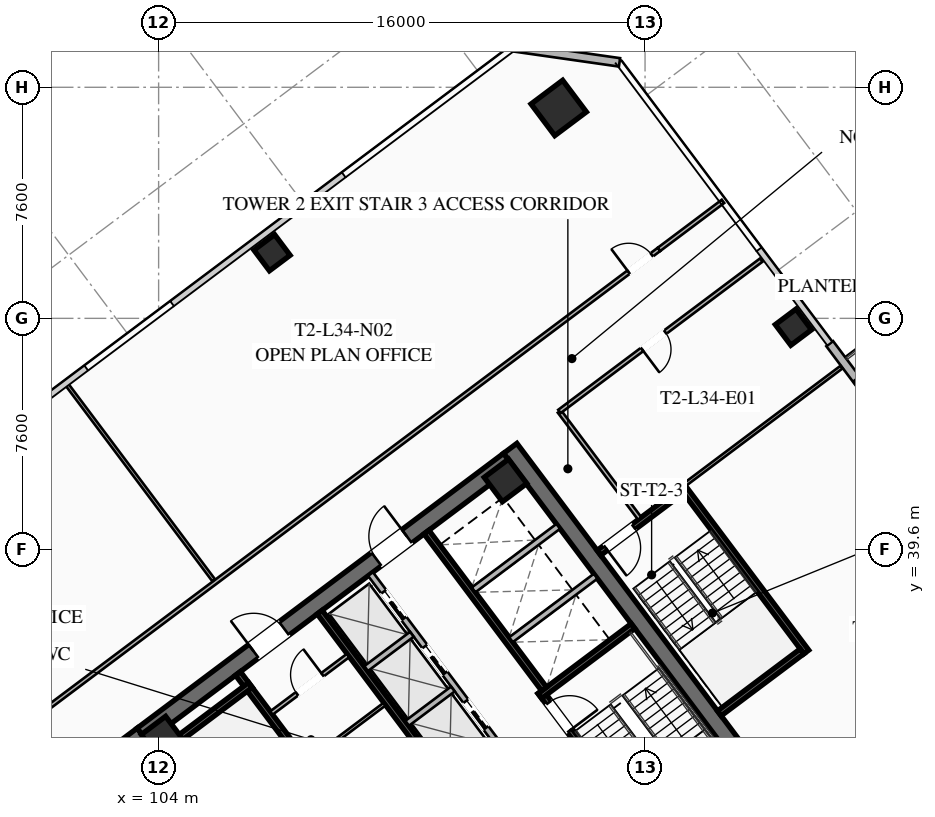
"""IFC4 building model, lengths in metres.
Left out: names, types, materials, properties, quantities, classifications, styles, units other than length and angle.
Written with IfcOpenShell. Run it as: python <this file> out.ifc"""

import sys

from ifc_helpers import new_model, si_unit, direction, frame, frame_2d, origin, origin_2d, place, context, subcontext, project, spatial, rectangle, hollow_rectangle, extrude, element, fill, save


model = new_model("IFC4")
c1 = context("Model", 3, precision=1e-05, world=origin(), true_north=direction((0.0, 1.0)))
c2 = subcontext(c1, "Body", "Model", "MODEL_VIEW")
j1 = project(units=[si_unit("LENGTHUNIT", "METRE"), si_unit("PLANEANGLEUNIT", "RADIAN")], contexts=[c1])
p1 = place(None, origin())
s1 = spatial("IfcSite", under=j1, at=p1, CompositionType="ELEMENT")
p2 = place(p1, origin())
s2 = spatial("IfcBuilding", under=s1, at=p2, CompositionType="ELEMENT")
p3 = place(p2, frame((0.0, 0.0, 128.6)))
s3 = spatial("IfcBuildingStorey", under=s2, at=p3, CompositionType="ELEMENT", Elevation=128.6)
for number, where, z_axis, x_axis in (
    (1, (112.436, 21.077, 0.0), (0.0, 0.0, 1.0), (-0.6, 0.8, 0.0)),
    (2, (115.564, 42.923, 0.0), (0.0, 0.0, 1.0), (0.6, -0.8, 0.0)),
):
    element("IfcWall", number, at=place(p3, frame(where, z_axis=z_axis, x_axis=x_axis)), inside=s3, PredefinedType="SHEAR", context=c2, shape_type="SweptSolid", body=[
        extrude(rectangle(XDim=15.6, YDim=0.55, at=frame_2d((7.8, 0.0))), origin(), (0.0, 0.0, 1.0), 3.55),
    ])
p4 = place(p3, frame((103.461, 33.502, 0.0), z_axis=(0.0, 0.0, 1.0), x_axis=(0.799998054672, 0.600002593761, 0.0)))
e3 = element("IfcWall", 3, at=p4, inside=s3, PredefinedType="SHEAR", context=c2, shape_type="SweptSolid", body=[
    extrude(rectangle(XDim=15.06, YDim=0.55, at=frame_2d((7.53, 0.0))), origin(), (0.0, 0.0, 1.0), 3.55),
])
p5 = place(p4, frame((4.58, 0.0, 0.0)))
e4 = element("IfcOpeningElement", 4, at=p5, cuts=e3, PredefinedType="OPENING", context=c2, shape_type="SweptSolid", body=[
    extrude(rectangle(XDim=1.25, YDim=2.25, at=frame_2d((0.625, 1.125))), frame((0.0, 0.285, 0.0), z_axis=(0.0, -1.0, 0.0), x_axis=(1.0, 0.0, 0.0)), (0.0, 0.0, 1.0), 0.57),
])
p6 = place(p4, frame((9.63, 0.0, 0.0)))
e5 = element("IfcOpeningElement", 5, at=p6, cuts=e3, PredefinedType="OPENING", context=c2, shape_type="SweptSolid", body=[
    extrude(rectangle(XDim=1.25, YDim=2.25, at=frame_2d((0.625, 1.125))), frame((0.0, 0.285, 0.0), z_axis=(0.0, -1.0, 0.0), x_axis=(1.0, 0.0, 0.0)), (0.0, 0.0, 1.0), 0.57),
])
for number, where, z_axis, x_axis in (
    (6, (115.41, 41.87, 0.0), (0.0, 0.0, 1.0), (0.8, 0.6, 0.0)),
    (7, (104.13, 33.41, 0.0), (0.0, 0.0, 1.0), (0.8, 0.6, 0.0)),
):
    element("IfcColumn", number, at=place(p3, frame(where, z_axis=z_axis, x_axis=x_axis)), inside=s3, PredefinedType="COLUMN", context=c2, shape_type="SweptSolid", body=[
        extrude(hollow_rectangle(XDim=1.0, YDim=1.0, WallThickness=0.04, at=origin_2d()), origin(), (0.0, 0.0, 1.0), 3.37),
    ])
p7 = place(p3, frame((117.16, 54.12, 0.0), z_axis=(0.0, 0.0, 1.0), x_axis=(0.799999996291, 0.600000004945, 0.0)))
e8 = element("IfcColumn", 8, at=p7, inside=s3, PredefinedType="COLUMN", context=c2, shape_type="SweptSolid", body=[
    extrude(hollow_rectangle(XDim=1.3, YDim=1.3, WallThickness=0.05, at=origin_2d()), origin(), (0.0, 0.0, 1.0), 3.37),
])
for number, where, z_axis, x_axis in (
    (9, (124.88, 46.91, 0.0), (0.0, 0.0, 1.0), (0.8, 0.6, 0.0)),
    (10, (107.73, 49.36, 0.0), (0.0, 0.0, 1.0), (0.8, 0.6, 0.0)),
):
    element("IfcColumn", number, at=place(p3, frame(where, z_axis=z_axis, x_axis=x_axis)), inside=s3, PredefinedType="COLUMN", context=c2, shape_type="SweptSolid", body=[
        extrude(hollow_rectangle(XDim=0.85, YDim=0.85, WallThickness=0.035, at=origin_2d()), origin(), (0.0, 0.0, 1.0), 3.37),
    ])
p8 = place(p3, frame((126.074, 46.368, 0.0), z_axis=(0.0, 0.0, 1.0), x_axis=(0.600018382406, -0.799986212866, 0.0)))
e11 = element("IfcWall", 11, at=p8, inside=s3, PredefinedType="SOLIDWALL", context=c2, shape_type="SweptSolid", body=[
    extrude(rectangle(XDim=8.5, YDim=0.28, at=frame_2d((4.25, 0.0))), origin(), (0.0, 0.0, 1.0), 3.37),
])
p9 = place(p8, frame((3.6, 0.0, 0.0)))
e12 = element("IfcOpeningElement", 12, at=p9, cuts=e11, PredefinedType="OPENING", context=c2, shape_type="SweptSolid", body=[
    extrude(rectangle(XDim=1.3, YDim=2.15, at=frame_2d((0.65, 1.075))), frame((0.0, 0.15, 0.0), z_axis=(0.0, -1.0, 0.0), x_axis=(1.0, 0.0, 0.0)), (0.0, 0.0, 1.0), 0.3),
])
p10 = place(p8, frame((1.46, 0.0, 0.85)))
e13 = element("IfcOpeningElement", 13, at=p10, cuts=e11, PredefinedType="OPENING", context=c2, shape_type="SweptSolid", body=[
    extrude(rectangle(XDim=1.8, YDim=1.92, at=frame_2d((0.9, 0.96))), frame((0.0, 0.15, 0.0), z_axis=(0.0, -1.0, 0.0), x_axis=(1.0, 0.0, 0.0)), (0.0, 0.0, 1.0), 0.3),
])
p11 = place(p3, frame((115.66, 56.12, 0.0), z_axis=(0.0, 0.0, 1.0), x_axis=(0.989949493661, -0.141421356237, 0.0)))
e14 = element("IfcWall", 14, at=p11, inside=s3, PredefinedType="SOLIDWALL", context=c2, shape_type="SweptSolid", body=[
    extrude(rectangle(XDim=3.536, YDim=0.28, at=frame_2d((1.768, 0.0))), origin(), (0.0, 0.0, 1.0), 3.37),
])
p12 = place(p3, frame((111.44, 29.08, 0.0), z_axis=(0.0, 0.0, 1.0), x_axis=(-0.59999029481, 0.8000072788, 0.0)))
e15 = element("IfcWall", 15, at=p12, inside=s3, PredefinedType="SHEAR", context=c2, shape_type="SweptSolid", body=[
    extrude(rectangle(XDim=8.05, YDim=0.2, at=frame_2d((4.025, 0.0))), origin(), (0.0, 0.0, 1.0), 3.37),
])
p13 = place(p12, frame((0.45, 0.0, 0.0)))
e16 = element("IfcOpeningElement", 16, at=p13, cuts=e15, PredefinedType="OPENING", context=c2, shape_type="SweptSolid", body=[
    extrude(rectangle(XDim=1.15, YDim=2.2, at=frame_2d((0.575, 1.1))), frame((0.0, 0.11, 0.0), z_axis=(0.0, -1.0, 0.0), x_axis=(1.0, 0.0, 0.0)), (0.0, 0.0, 1.0), 0.22),
])
p14 = place(p3, frame((103.956, 32.842, 0.0), z_axis=(0.0, 0.0, 1.0), x_axis=(0.800015298837, 0.599979601008, 0.0)))
e17 = element("IfcWall", 17, at=p14, inside=s3, PredefinedType="SHEAR", context=c2, shape_type="SweptSolid", body=[
    extrude(rectangle(XDim=3.83, YDim=0.2, at=frame_2d((1.915, 0.0))), origin(), (0.0, 0.0, 1.0), 3.37),
])
p15 = place(p3, frame((116.56, 34.92, 0.0), z_axis=(0.0, 0.0, 1.0), x_axis=(0.59999029481, -0.8000072788, 0.0)))
e18 = element("IfcWall", 18, at=p15, inside=s3, PredefinedType="SHEAR", context=c2, shape_type="SweptSolid", body=[
    extrude(rectangle(XDim=8.05, YDim=0.2, at=frame_2d((4.025, 0.0))), origin(), (0.0, 0.0, 1.0), 3.37),
])
p16 = place(p15, frame((0.45, 0.0, 0.0)))
e19 = element("IfcOpeningElement", 19, at=p16, cuts=e18, PredefinedType="OPENING", context=c2, shape_type="SweptSolid", body=[
    extrude(rectangle(XDim=1.15, YDim=2.2, at=frame_2d((0.575, 1.1))), frame((0.0, 0.11, 0.0), z_axis=(0.0, -1.0, 0.0), x_axis=(1.0, 0.0, 0.0)), (0.0, 0.0, 1.0), 0.22),
])
p17 = place(p3, frame((116.54, 34.78, 0.0), z_axis=(0.0, 0.0, 1.0), x_axis=(0.800015298837, 0.599979601008, 0.0)))
e20 = element("IfcWall", 20, at=p17, inside=s3, PredefinedType="SHEAR", context=c2, shape_type="SweptSolid", body=[
    extrude(rectangle(XDim=3.83, YDim=0.2, at=frame_2d((1.915, 0.0))), origin(), (0.0, 0.0, 1.0), 3.37),
])
p18 = place(p3, frame((117.998, 25.936, 0.0), z_axis=(0.0, 0.0, 1.0), x_axis=(-0.600002693989, 0.799997979501, 0.0)))
e21 = element("IfcWall", 21, at=p18, inside=s3, PredefinedType="SHEAR", context=c2, shape_type="SweptSolid", body=[
    extrude(rectangle(XDim=14.5, YDim=0.2, at=frame_2d((7.25, 0.0))), origin(), (0.0, 0.0, 1.0), 3.37),
])
p19 = place(p3, frame((112.81, 40.17, 0.0), z_axis=(0.0, 0.0, 1.0), x_axis=(0.599993943644, -0.800004542231, 0.0)))
e22 = element("IfcWall", 22, at=p19, inside=s3, PredefinedType="SHEAR", context=c2, shape_type="SweptSolid", body=[
    extrude(rectangle(XDim=6.45, YDim=0.2, at=frame_2d((3.225, 0.0))), origin(), (0.0, 0.0, 1.0), 3.37),
])
for number, where, z_axis, x_axis in (
    (23, (115.59, 36.63, 0.0), (0.0, 0.0, 1.0), (0.8, 0.6, 0.0)),
    (24, (114.36, 38.27, 0.0), (0.0, 0.0, 1.0), (0.8, 0.6, 0.0)),
):
    element("IfcWall", number, at=place(p3, frame(where, z_axis=z_axis, x_axis=x_axis)), inside=s3, PredefinedType="SOLIDWALL", context=c2, shape_type="SweptSolid", body=[
        extrude(rectangle(XDim=3.48, YDim=0.2, at=frame_2d((1.74, 0.0))), origin(), (0.0, 0.0, 1.0), 3.37),
    ])
p20 = place(p3, frame((107.71, 34.22, 0.0), z_axis=(0.0, 0.0, 1.0), x_axis=(0.799981399002, 0.60002480053, 0.0)))
e25 = element("IfcWall", 25, at=p20, inside=s3, PredefinedType="PARTITIONING", context=c2, shape_type="SweptSolid", body=[
    extrude(rectangle(XDim=3.15, YDim=0.135, at=frame_2d((1.575, 0.0))), origin(), (0.0, 0.0, 1.0), 2.723),
])
p21 = place(p20, frame((1.05, 0.0, 0.0)))
e26 = element("IfcOpeningElement", 26, at=p21, cuts=e25, PredefinedType="OPENING", context=c2, shape_type="SweptSolid", body=[
    extrude(rectangle(XDim=1.05, YDim=2.2, at=frame_2d((0.525, 1.1))), frame((0.0, 0.077, 0.0), z_axis=(0.0, -1.0, 0.0), x_axis=(1.0, 0.0, 0.0)), (0.0, 0.0, 1.0), 0.155),
])
p22 = place(p3, frame((108.91, 32.62, 0.0), z_axis=(0.0, 0.0, 1.0), x_axis=(0.800018601094, 0.59997519774, 0.0)))
e27 = element("IfcWall", 27, at=p22, inside=s3, PredefinedType="PARTITIONING", context=c2, shape_type="SweptSolid", body=[
    extrude(rectangle(XDim=3.15, YDim=0.11, at=frame_2d((1.575, 0.0))), origin(), (0.0, 0.0, 1.0), 2.723),
])
p23 = place(p3, frame((115.11, 33.27, 0.0), z_axis=(0.0, 0.0, 1.0), x_axis=(-0.600011322243, 0.799991508192, 0.0)))
e28 = element("IfcWall", 28, at=p23, inside=s3, PredefinedType="SOLIDWALL", context=c2, shape_type="SweptSolid", body=[
    extrude(rectangle(XDim=6.9, YDim=0.2, at=frame_2d((3.45, 0.0))), origin(), (0.0, 0.0, 1.0), 3.37),
])
p24 = place(p23, frame((0.575, 0.0, 0.0)))
e29 = element("IfcOpeningElement", 29, at=p24, cuts=e28, PredefinedType="OPENING", context=c2, shape_type="SweptSolid", body=[
    extrude(rectangle(XDim=1.1, YDim=2.2, at=frame_2d((0.55, 1.1))), frame((0.0, 0.11, 0.0), z_axis=(0.0, -1.0, 0.0), x_axis=(1.0, 0.0, 0.0)), (0.0, 0.0, 1.0), 0.22),
])
p25 = place(p23, frame((2.825, 0.0, 0.0)))
e30 = element("IfcOpeningElement", 30, at=p25, cuts=e28, PredefinedType="OPENING", context=c2, shape_type="SweptSolid", body=[
    extrude(rectangle(XDim=1.1, YDim=2.2, at=frame_2d((0.55, 1.1))), frame((0.0, 0.11, 0.0), z_axis=(0.0, -1.0, 0.0), x_axis=(1.0, 0.0, 0.0)), (0.0, 0.0, 1.0), 0.22),
])
p26 = place(p23, frame((5.075, 0.0, 0.0)))
e31 = element("IfcOpeningElement", 31, at=p26, cuts=e28, PredefinedType="OPENING", context=c2, shape_type="SweptSolid", body=[
    extrude(rectangle(XDim=1.1, YDim=2.2, at=frame_2d((0.55, 1.1))), frame((0.0, 0.11, 0.0), z_axis=(0.0, -1.0, 0.0), x_axis=(1.0, 0.0, 0.0)), (0.0, 0.0, 1.0), 0.22),
])
p27 = place(p3, frame((112.176, 33.882, 0.0), z_axis=(0.0, 0.0, 1.0), x_axis=(0.8, 0.6, 0.0)))
e32 = element("IfcWall", 32, at=p27, inside=s3, PredefinedType="SOLIDWALL", context=c2, shape_type="SweptSolid", body=[
    extrude(rectangle(XDim=1.88, YDim=0.2, at=frame_2d((0.94, 0.0))), origin(), (0.0, 0.0, 1.0), 3.37),
])
p28 = place(p3, frame((110.826, 35.682, 0.0), z_axis=(0.0, 0.0, 1.0), x_axis=(0.799984418148, 0.600020775241, 0.0)))
e33 = element("IfcWall", 33, at=p28, inside=s3, PredefinedType="SOLIDWALL", context=c2, shape_type="SweptSolid", body=[
    extrude(rectangle(XDim=1.88, YDim=0.2, at=frame_2d((0.94, 0.0))), origin(), (0.0, 0.0, 1.0), 3.37),
])
p29 = place(p3, frame((125.304, 36.228, 0.0), z_axis=(0.0, 0.0, 1.0), x_axis=(-0.59998851072, 0.800008616831, 0.0)))
e34 = element("IfcWall", 34, at=p29, inside=s3, PredefinedType="SHEAR", context=c2, shape_type="SweptSolid", body=[
    extrude(rectangle(XDim=6.8, YDim=0.2, at=frame_2d((3.4, 0.0))), origin(), (0.0, 0.0, 1.0), 3.37),
])
p30 = place(p3, frame((121.204, 41.528, 0.0), z_axis=(0.0, 0.0, 1.0), x_axis=(-0.800017232136, -0.599977023131, 0.0)))
e35 = element("IfcWall", 35, at=p30, inside=s3, PredefinedType="SHEAR", context=c2, shape_type="SweptSolid", body=[
    extrude(rectangle(XDim=3.4, YDim=0.2, at=frame_2d((1.7, 0.0))), origin(), (0.0, 0.0, 1.0), 3.37),
])
p31 = place(p30, frame((1.975, 0.0, 0.0)))
e36 = element("IfcOpeningElement", 36, at=p31, cuts=e35, PredefinedType="OPENING", context=c2, shape_type="SweptSolid", body=[
    extrude(rectangle(XDim=1.15, YDim=2.2, at=frame_2d((0.575, 1.1))), frame((0.0, 0.11, 0.0), z_axis=(0.0, -1.0, 0.0), x_axis=(1.0, 0.0, 0.0)), (0.0, 0.0, 1.0), 0.22),
])
p32 = place(p3, frame((122.444, 34.208, 0.0), z_axis=(0.0, 0.0, 1.0), x_axis=(0.79999138319, 0.600011488909, 0.0)))
e37 = element("IfcWall", 37, at=p32, inside=s3, PredefinedType="SHEAR", context=c2, shape_type="SweptSolid", body=[
    extrude(rectangle(XDim=3.4, YDim=0.2, at=frame_2d((1.7, 0.0))), origin(), (0.0, 0.0, 1.0), 3.37),
])
p33 = place(p3, frame((119.824, 40.618, 0.0), z_axis=(0.0, 0.0, 1.0), x_axis=(-0.599982243973, 0.800013316712, 0.0)))
e38 = element("IfcWall", 38, at=p33, inside=s3, PredefinedType="PARTITIONING", context=c2, shape_type="SweptSolid", body=[
    extrude(rectangle(XDim=4.4, YDim=0.135, at=frame_2d((2.2, 0.0))), origin(), (0.0, 0.0, 1.0), 2.723),
])
p34 = place(p3, frame((95.42, 30.69, 0.0), z_axis=(0.0, 0.0, 1.0), x_axis=(0.8, 0.6, 0.0)))
e39 = element("IfcWall", 39, at=p34, inside=s3, PredefinedType="PARTITIONING", context=c2, shape_type="SweptSolid", body=[
    extrude(rectangle(XDim=31.3, YDim=0.135, at=frame_2d((15.65, 0.0))), origin(), (0.0, 0.0, 1.0), 2.723),
])
p35 = place(p34, frame((0.3, 0.0, 0.0)))
e40 = element("IfcOpeningElement", 40, at=p35, cuts=e39, PredefinedType="OPENING", context=c2, shape_type="SweptSolid", body=[
    extrude(rectangle(XDim=0.95, YDim=2.05, at=frame_2d((0.475, 1.025))), frame((0.0, 0.077, 0.0), z_axis=(0.0, -1.0, 0.0), x_axis=(1.0, 0.0, 0.0)), (0.0, 0.0, 1.0), 0.155),
])
p36 = place(p34, frame((30.05, 0.0, 0.0)))
e41 = element("IfcOpeningElement", 41, at=p36, cuts=e39, PredefinedType="OPENING", context=c2, shape_type="SweptSolid", body=[
    extrude(rectangle(XDim=0.95, YDim=2.05, at=frame_2d((0.475, 1.025))), frame((0.0, 0.077, 0.0), z_axis=(0.0, -1.0, 0.0), x_axis=(1.0, 0.0, 0.0)), (0.0, 0.0, 1.0), 0.155),
])
p37 = place(p3, frame((120.46, 49.47, 0.0), z_axis=(0.0, 0.0, 1.0), x_axis=(0.799977721118, 0.600029704027, 0.0)))
e42 = element("IfcWall", 42, at=p37, inside=s3, PredefinedType="PARTITIONING", context=c2, shape_type="SweptSolid", body=[
    extrude(rectangle(XDim=2.63, YDim=0.135, at=frame_2d((1.315, 0.0))), origin(), (0.0, 0.0, 1.0), 2.723),
])
p38 = place(p3, frame((105.812, 38.584, 0.0), z_axis=(0.0, 0.0, 1.0), x_axis=(-0.60000964496, 0.799992766189, 0.0)))
e43 = element("IfcWall", 43, at=p38, inside=s3, PredefinedType="PARTITIONING", context=c2, shape_type="SweptSolid", body=[
    extrude(rectangle(XDim=8.1, YDim=0.11, at=frame_2d((4.05, 0.0))), origin(), (0.0, 0.0, 1.0), 2.723),
])
p39 = place(p3, frame((132.262, 33.734, 0.0), z_axis=(0.0, 0.0, 1.0), x_axis=(-0.800003744006, -0.59999500796, 0.0)))
e44 = element("IfcWall", 44, at=p39, inside=s3, PredefinedType="PARTITIONING", context=c2, shape_type="SweptSolid", body=[
    extrude(rectangle(XDim=31.3, YDim=0.135, at=frame_2d((15.65, 0.0))), origin(), (0.0, 0.0, 1.0), 2.723),
])
p40 = place(p39, frame((29.97, 0.0, 0.0)))
e45 = element("IfcOpeningElement", 45, at=p40, cuts=e44, PredefinedType="OPENING", context=c2, shape_type="SweptSolid", body=[
    extrude(rectangle(XDim=0.95, YDim=2.05, at=frame_2d((0.475, 1.025))), frame((0.0, 0.077, 0.0), z_axis=(0.0, -1.0, 0.0), x_axis=(1.0, 0.0, 0.0)), (0.0, 0.0, 1.0), 0.155),
])
p41 = place(p39, frame((15.43, 0.0, 0.0)))
e46 = element("IfcOpeningElement", 46, at=p41, cuts=e44, PredefinedType="OPENING", context=c2, shape_type="SweptSolid", body=[
    extrude(rectangle(XDim=0.95, YDim=2.05, at=frame_2d((0.475, 1.025))), frame((0.0, 0.077, 0.0), z_axis=(0.0, -1.0, 0.0), x_axis=(1.0, 0.0, 0.0)), (0.0, 0.0, 1.0), 0.155),
])
p42 = place(p39, frame((11.146, 0.0, 0.0)))
e47 = element("IfcOpeningElement", 47, at=p42, cuts=e44, PredefinedType="OPENING", context=c2, shape_type="SweptSolid", body=[
    extrude(rectangle(XDim=0.95, YDim=2.05, at=frame_2d((0.475, 1.025))), frame((0.0, 0.077, 0.0), z_axis=(0.0, -1.0, 0.0), x_axis=(1.0, 0.0, 0.0)), (0.0, 0.0, 1.0), 0.155),
])
p43 = place(p39, frame((0.38, 0.0, 0.0)))
e48 = element("IfcOpeningElement", 48, at=p43, cuts=e44, PredefinedType="OPENING", context=c2, shape_type="SweptSolid", body=[
    extrude(rectangle(XDim=0.95, YDim=2.05, at=frame_2d((0.475, 1.025))), frame((0.0, 0.077, 0.0), z_axis=(0.0, -1.0, 0.0), x_axis=(1.0, 0.0, 0.0)), (0.0, 0.0, 1.0), 0.155),
])
p44 = place(p3, frame((123.824, 49.118, 0.0), z_axis=(0.0, 0.0, 1.0), x_axis=(-0.799996470201, -0.60000470637, 0.0)))
e49 = element("IfcWall", 49, at=p44, inside=s3, PredefinedType="PARTITIONING", context=c2, shape_type="SweptSolid", body=[
    extrude(rectangle(XDim=8.3, YDim=0.135, at=frame_2d((4.15, 0.0))), origin(), (0.0, 0.0, 1.0), 2.723),
])
p45 = place(p44, frame((3.95, 0.0, 0.0)))
e50 = element("IfcOpeningElement", 50, at=p45, cuts=e49, PredefinedType="OPENING", context=c2, shape_type="SweptSolid", body=[
    extrude(rectangle(XDim=0.95, YDim=2.05, at=frame_2d((0.475, 1.025))), frame((0.0, 0.077, 0.0), z_axis=(0.0, -1.0, 0.0), x_axis=(1.0, 0.0, 0.0)), (0.0, 0.0, 1.0), 0.155),
])
p46 = place(p3, frame((125.208, 30.656, 0.0), z_axis=(0.0, 0.0, 1.0), x_axis=(0.800005876956, 0.599992163979, 0.0)))
e51 = element("IfcWall", 51, at=p46, inside=s3, PredefinedType="PARTITIONING", context=c2, shape_type="SweptSolid", body=[
    extrude(rectangle(XDim=9.97, YDim=0.135, at=frame_2d((4.985, 0.0))), origin(), (0.0, 0.0, 1.0), 2.723),
])
p47 = place(p46, frame((2.045, 0.0, 0.0)))
e52 = element("IfcOpeningElement", 52, at=p47, cuts=e51, PredefinedType="OPENING", context=c2, shape_type="SweptSolid", body=[
    extrude(rectangle(XDim=0.95, YDim=2.05, at=frame_2d((0.475, 1.025))), frame((0.0, 0.077, 0.0), z_axis=(0.0, -1.0, 0.0), x_axis=(1.0, 0.0, 0.0)), (0.0, 0.0, 1.0), 0.155),
])
p48 = place(p3, frame((126.464, 45.598, 0.0), z_axis=(0.0, 0.0, 1.0), x_axis=(-0.8000181681, -0.599975775102, 0.0)))
e53 = element("IfcWall", 53, at=p48, inside=s3, PredefinedType="PARTITIONING", context=c2, shape_type="SweptSolid", body=[
    extrude(rectangle(XDim=6.45, YDim=0.11, at=frame_2d((3.225, 0.0))), origin(), (0.0, 0.0, 1.0), 2.723),
])
p49 = place(p5, origin())
e54 = element("IfcDoor", 54, at=p49, inside=s3, OperationType="SINGLE_SWING_LEFT", PredefinedType="DOOR", context=c2, shape_type="SweptSolid", body=[
    extrude(rectangle(XDim=1.25, YDim=2.25, at=frame_2d((0.625, 1.125))), frame((0.0, 0.025, 0.0), z_axis=(0.0, -1.0, 0.0), x_axis=(1.0, 0.0, 0.0)), (0.0, 0.0, 1.0), 0.05),
])
fill(e4, e54)
p50 = place(p6, origin())
e55 = element("IfcDoor", 55, at=p50, inside=s3, OperationType="SINGLE_SWING_RIGHT", PredefinedType="DOOR", context=c2, shape_type="SweptSolid", body=[
    extrude(rectangle(XDim=1.25, YDim=2.25, at=frame_2d((0.625, 1.125))), frame((0.0, 0.025, 0.0), z_axis=(0.0, -1.0, 0.0), x_axis=(1.0, 0.0, 0.0)), (0.0, 0.0, 1.0), 0.05),
])
fill(e5, e55)
p51 = place(p16, origin())
e56 = element("IfcDoor", 56, at=p51, inside=s3, OperationType="SINGLE_SWING_RIGHT", PredefinedType="DOOR", context=c2, shape_type="SweptSolid", body=[
    extrude(rectangle(XDim=1.15, YDim=2.2, at=frame_2d((0.575, 1.1))), frame((0.0, 0.025, 0.0), z_axis=(0.0, -1.0, 0.0), x_axis=(1.0, 0.0, 0.0)), (0.0, 0.0, 1.0), 0.05),
])
fill(e19, e56)
p52 = place(p21, origin())
e57 = element("IfcDoor", 57, at=p52, inside=s3, OperationType="SINGLE_SWING_RIGHT", PredefinedType="DOOR", context=c2, shape_type="SweptSolid", body=[
    extrude(rectangle(XDim=1.05, YDim=2.2, at=frame_2d((0.525, 1.1))), frame((0.0, 0.025, 0.0), z_axis=(0.0, -1.0, 0.0), x_axis=(1.0, 0.0, 0.0)), (0.0, 0.0, 1.0), 0.05),
])
fill(e26, e57)
p53 = place(p31, origin())
e58 = element("IfcDoor", 58, at=p53, inside=s3, OperationType="SINGLE_SWING_RIGHT", PredefinedType="DOOR", context=c2, shape_type="SweptSolid", body=[
    extrude(rectangle(XDim=1.15, YDim=2.2, at=frame_2d((0.575, 1.1))), frame((0.0, 0.025, 0.0), z_axis=(0.0, -1.0, 0.0), x_axis=(1.0, 0.0, 0.0)), (0.0, 0.0, 1.0), 0.05),
])
fill(e36, e58)
p54 = place(p36, origin())
e59 = element("IfcDoor", 59, at=p54, inside=s3, OperationType="SINGLE_SWING_LEFT", PredefinedType="DOOR", context=c2, shape_type="SweptSolid", body=[
    extrude(rectangle(XDim=0.95, YDim=2.05, at=frame_2d((0.475, 1.025))), frame((0.0, 0.025, 0.0), z_axis=(0.0, -1.0, 0.0), x_axis=(1.0, 0.0, 0.0)), (0.0, 0.0, 1.0), 0.05),
])
fill(e41, e59)
p55 = place(p45, origin())
e60 = element("IfcDoor", 60, at=p55, inside=s3, OperationType="SINGLE_SWING_RIGHT", PredefinedType="DOOR", context=c2, shape_type="SweptSolid", body=[
    extrude(rectangle(XDim=0.95, YDim=2.05, at=frame_2d((0.475, 1.025))), frame((0.0, 0.025, 0.0), z_axis=(0.0, -1.0, 0.0), x_axis=(1.0, 0.0, 0.0)), (0.0, 0.0, 1.0), 0.05),
])
fill(e50, e60)
p56 = place(p24, origin())
e61 = element("IfcDoor", 61, at=p56, inside=s3, OperationType="SLIDING_TO_LEFT", PredefinedType="DOOR", context=c2, shape_type="SweptSolid", body=[
    extrude(rectangle(XDim=1.1, YDim=2.2, at=frame_2d((0.55, 1.1))), frame((0.0, 0.025, 0.0), z_axis=(0.0, -1.0, 0.0), x_axis=(1.0, 0.0, 0.0)), (0.0, 0.0, 1.0), 0.05),
])
fill(e29, e61)
p57 = place(p25, origin())
e62 = element("IfcDoor", 62, at=p57, inside=s3, OperationType="SLIDING_TO_LEFT", PredefinedType="DOOR", context=c2, shape_type="SweptSolid", body=[
    extrude(rectangle(XDim=1.1, YDim=2.2, at=frame_2d((0.55, 1.1))), frame((0.0, 0.025, 0.0), z_axis=(0.0, -1.0, 0.0), x_axis=(1.0, 0.0, 0.0)), (0.0, 0.0, 1.0), 0.05),
])
fill(e30, e62)
p58 = place(p26, origin())
e63 = element("IfcDoor", 63, at=p58, inside=s3, OperationType="SLIDING_TO_LEFT", PredefinedType="DOOR", context=c2, shape_type="SweptSolid", body=[
    extrude(rectangle(XDim=1.1, YDim=2.2, at=frame_2d((0.55, 1.1))), frame((0.0, 0.025, 0.0), z_axis=(0.0, -1.0, 0.0), x_axis=(1.0, 0.0, 0.0)), (0.0, 0.0, 1.0), 0.05),
])
fill(e31, e63)
save(model, sys.argv[1])
